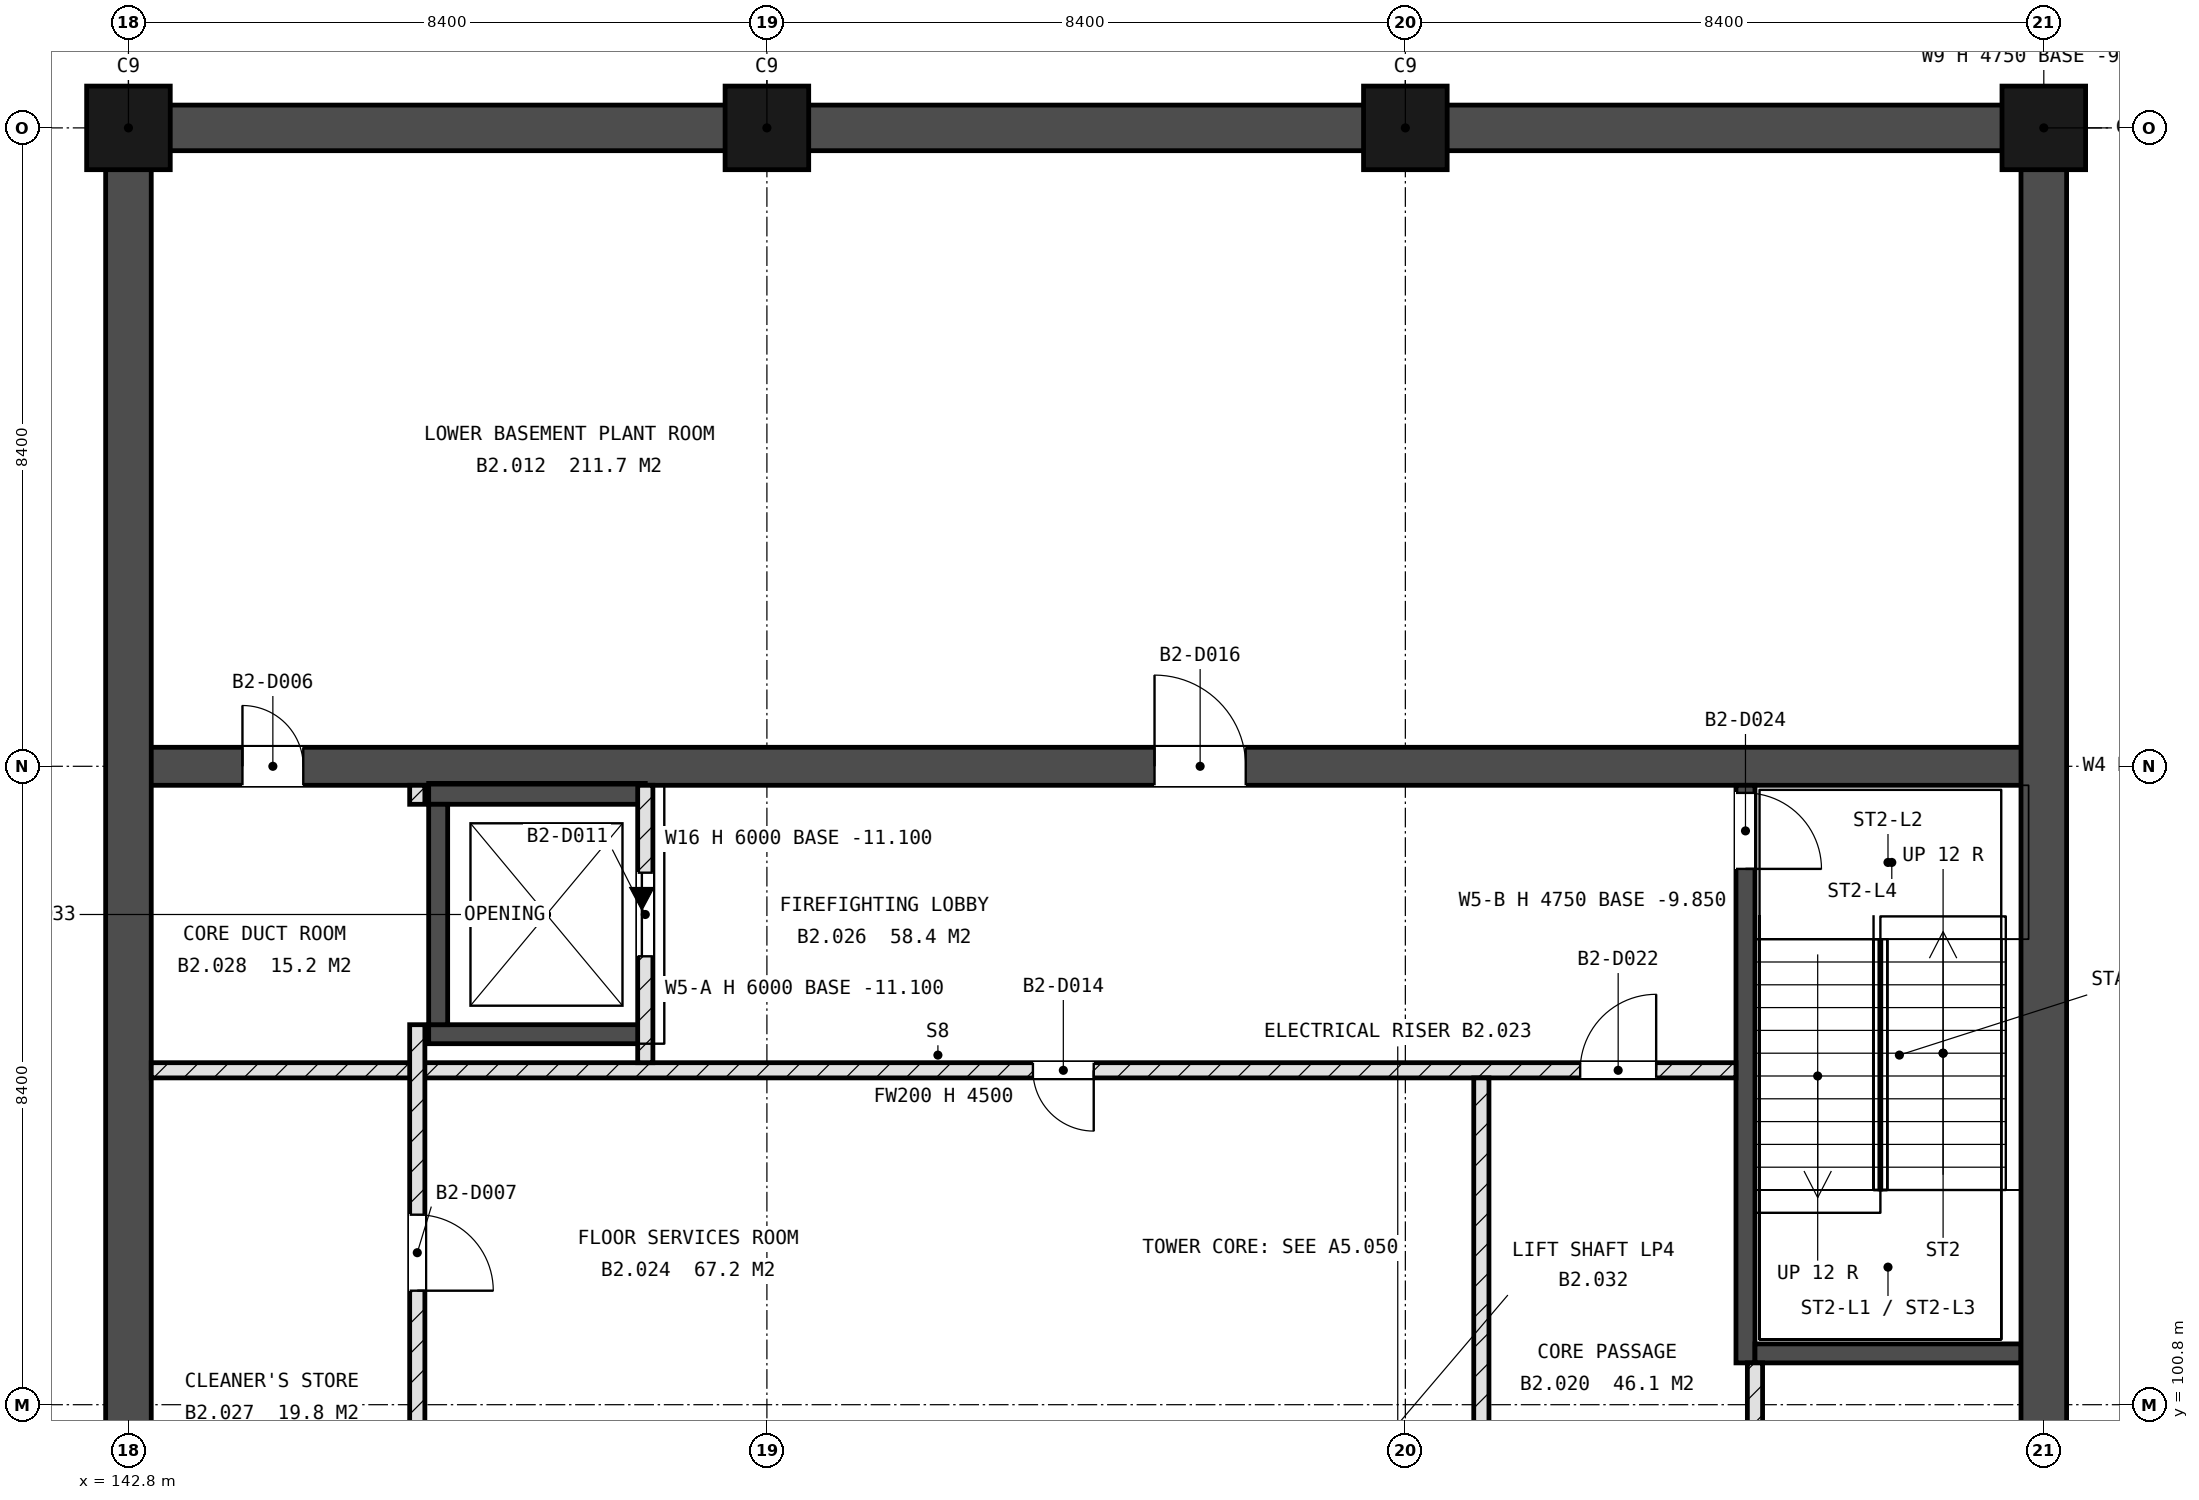
"""IFC4 building model, lengths in metres.
Left out: names, types, materials, properties, quantities, classifications, styles, units other than length and angle.
Written with IfcOpenShell. Run it as: python <this file> out.ifc"""

import sys

from ifc_helpers import new_model, si_unit, direction, frame, frame_2d, origin, origin_2d, place, context, subcontext, project, spatial, rectangle, extrude, element, fill, save


model = new_model("IFC4")
c1 = context("Model", 3, precision=1e-05, world=origin(), true_north=direction((0.0, 1.0)))
c2 = subcontext(c1, "Body", "Model", "MODEL_VIEW")
j1 = project(units=[si_unit("LENGTHUNIT", "METRE"), si_unit("PLANEANGLEUNIT", "RADIAN")], contexts=[c1])
p1 = place(None, origin())
s1 = spatial("IfcSite", under=j1, at=p1, CompositionType="ELEMENT")
p2 = place(p1, origin())
s2 = spatial("IfcBuilding", under=s1, at=p2, CompositionType="ELEMENT")
p3 = place(p2, frame((0.0, 0.0, -9.6)))
s3 = spatial("IfcBuildingStorey", under=s2, at=p3, CompositionType="ELEMENT", Elevation=-9.6)
for number, where, z_axis, x_axis in (
    (1, (142.8, 117.6, -0.25), (0.0, 0.0, 1.0), (1.0, 0.0, 0.0)),
    (2, (151.2, 117.6, -0.25), (0.0, 0.0, 1.0), (1.0, 0.0, 0.0)),
    (3, (159.6, 117.6, -0.25), (0.0, 0.0, 1.0), (1.0, 0.0, 0.0)),
    (4, (168.0, 117.6, -0.25), (0.0, 0.0, 1.0), (1.0, 0.0, 0.0)),
):
    element("IfcColumn", number, at=place(p3, frame(where, z_axis=z_axis, x_axis=x_axis)), inside=s3, PredefinedType="COLUMN", context=c2, shape_type="SweptSolid", body=[
        extrude(rectangle(XDim=1.1, YDim=1.1, at=origin_2d()), origin(), (0.0, 0.0, 1.0), 4.75),
    ])
p4 = place(p3, frame((142.8, 109.2, -0.25), z_axis=(0.0, 0.0, 1.0), x_axis=(1.0, 0.0, 0.0)))
e5 = element("IfcWall", 5, at=p4, inside=s3, PredefinedType="SHEAR", context=c2, shape_type="SweptSolid", body=[
    extrude(rectangle(XDim=25.2, YDim=0.5, at=frame_2d((12.6, 0.0))), origin(), (0.0, 0.0, 1.0), 4.75),
])
p5 = place(p4, frame((13.5, 0.0, 0.25)))
e6 = element("IfcOpeningElement", 6, at=p5, cuts=e5, PredefinedType="OPENING", context=c2, shape_type="SweptSolid", body=[
    extrude(rectangle(XDim=1.2, YDim=2.4, at=frame_2d((0.6, 1.2))), frame((0.0, 0.26, 0.0), z_axis=(0.0, -1.0, 0.0), x_axis=(1.0, 0.0, 0.0)), (0.0, 0.0, 1.0), 0.52),
])
p6 = place(p4, frame((1.5, 0.0, 0.25)))
e7 = element("IfcOpeningElement", 7, at=p6, cuts=e5, PredefinedType="OPENING", context=c2, shape_type="SweptSolid", body=[
    extrude(rectangle(XDim=0.8, YDim=2.1, at=frame_2d((0.4, 1.05))), frame((0.0, 0.26, 0.0), z_axis=(0.0, -1.0, 0.0), x_axis=(1.0, 0.0, 0.0)), (0.0, 0.0, 1.0), 0.52),
])
p7 = place(p3, frame((164.075, 101.35, -0.25), z_axis=(0.0, 0.0, 1.0), x_axis=(0.0, 1.0, 0.0)))
e8 = element("IfcWall", 8, at=p7, inside=s3, PredefinedType="SHEAR", context=c2, shape_type="SweptSolid", body=[
    extrude(rectangle(XDim=7.6, YDim=0.25, at=frame_2d((3.8, 0.0))), origin(), (0.0, 0.0, 1.0), 4.75),
])
p8 = place(p7, frame((6.5, 0.0, 0.25)))
e9 = element("IfcOpeningElement", 9, at=p8, cuts=e8, PredefinedType="OPENING", context=c2, shape_type="SweptSolid", body=[
    extrude(rectangle(XDim=1.0, YDim=2.1, at=frame_2d((0.5, 1.05))), frame((0.0, 0.135, 0.0), z_axis=(0.0, -1.0, 0.0), x_axis=(1.0, 0.0, 0.0)), (0.0, 0.0, 1.0), 0.27),
])
p9 = place(p3, frame((164.2, 101.475, -0.25), z_axis=(0.0, 0.0, 1.0), x_axis=(1.0, 0.0, 0.0)))
e10 = element("IfcWall", 10, at=p9, inside=s3, PredefinedType="SHEAR", context=c2, shape_type="SweptSolid", body=[
    extrude(rectangle(XDim=3.5, YDim=0.25, at=frame_2d((1.75, 0.0))), origin(), (0.0, 0.0, 1.0), 4.75),
])
p10 = place(p3, frame((146.75, 105.675, -1.5), z_axis=(0.0, 0.0, 1.0), x_axis=(1.0, 0.0, 0.0)))
e11 = element("IfcWall", 11, at=p10, inside=s3, PredefinedType="SHEAR", context=c2, shape_type="SweptSolid", body=[
    extrude(rectangle(XDim=2.85, YDim=0.25, at=frame_2d((1.425, 0.0))), origin(), (0.0, 0.0, 1.0), 6.0),
])
p11 = place(p3, frame((146.75, 108.837, -1.5), z_axis=(0.0, 0.0, 1.0), x_axis=(1.0, 0.0, 0.0)))
e12 = element("IfcWall", 12, at=p11, inside=s3, PredefinedType="SHEAR", context=c2, shape_type="SweptSolid", body=[
    extrude(rectangle(XDim=2.85, YDim=0.275, at=frame_2d((1.425, 0.0))), origin(), (0.0, 0.0, 1.0), 6.0),
])
p12 = place(p3, frame((146.875, 105.8, -1.5), z_axis=(0.0, 0.0, 1.0), x_axis=(0.0, 1.0, 0.0)))
e13 = element("IfcWall", 13, at=p12, inside=s3, PredefinedType="SHEAR", context=c2, shape_type="SweptSolid", body=[
    extrude(rectangle(XDim=2.9, YDim=0.25, at=frame_2d((1.45, 0.0))), origin(), (0.0, 0.0, 1.0), 6.0),
])
p13 = place(p3, frame((168.0, -0.3, -0.25), z_axis=(0.0, 0.0, 1.0), x_axis=(0.0, 1.0, 0.0)))
e14 = element("IfcWall", 14, at=p13, inside=s3, PredefinedType="SOLIDWALL", context=c2, shape_type="SweptSolid", body=[
    extrude(rectangle(XDim=118.2, YDim=0.6, at=frame_2d((59.1, 0.0))), origin(), (0.0, 0.0, 1.0), 4.75),
])
p14 = place(p3, frame((168.3, 117.6, -0.25), z_axis=(0.0, 0.0, 1.0), x_axis=(-1.0, 0.0, 0.0)))
e15 = element("IfcWall", 15, at=p14, inside=s3, PredefinedType="SOLIDWALL", context=c2, shape_type="SweptSolid", body=[
    extrude(rectangle(XDim=25.8, YDim=0.6, at=frame_2d((12.9, 0.0))), origin(), (0.0, 0.0, 1.0), 4.75),
])
p15 = place(p3, frame((142.8, 117.9, -0.25), z_axis=(0.0, 0.0, 1.0), x_axis=(0.0, -1.0, 0.0)))
e16 = element("IfcWall", 16, at=p15, inside=s3, PredefinedType="SOLIDWALL", context=c2, shape_type="SweptSolid", body=[
    extrude(rectangle(XDim=34.2, YDim=0.6, at=frame_2d((17.1, 0.0))), origin(), (0.0, 0.0, 1.0), 4.75),
])
p16 = place(p3, frame((143.1, 105.2, 0.0), z_axis=(0.0, 0.0, 1.0), x_axis=(1.0, 0.0, 0.0)))
e17 = element("IfcWall", 17, at=p16, inside=s3, PredefinedType="SOLIDWALL", context=c2, shape_type="SweptSolid", body=[
    extrude(rectangle(XDim=20.85, YDim=0.2, at=frame_2d((10.425, 0.0))), origin(), (0.0, 0.0, 1.0), 4.5),
])
p17 = place(p16, frame((11.6, 0.0, 0.0)))
e18 = element("IfcOpeningElement", 18, at=p17, cuts=e17, PredefinedType="OPENING", context=c2, shape_type="SweptSolid", body=[
    extrude(rectangle(XDim=0.8, YDim=2.1, at=frame_2d((0.4, 1.05))), frame((0.0, 0.11, 0.0), z_axis=(0.0, -1.0, 0.0), x_axis=(1.0, 0.0, 0.0)), (0.0, 0.0, 1.0), 0.22),
])
p18 = place(p16, frame((18.8, 0.0, 0.0)))
e19 = element("IfcOpeningElement", 19, at=p18, cuts=e17, PredefinedType="OPENING", context=c2, shape_type="SweptSolid", body=[
    extrude(rectangle(XDim=1.0, YDim=2.1, at=frame_2d((0.5, 1.05))), frame((0.0, 0.11, 0.0), z_axis=(0.0, -1.0, 0.0), x_axis=(1.0, 0.0, 0.0)), (0.0, 0.0, 1.0), 0.22),
])
p19 = place(p3, frame((146.6, 100.5, 0.0), z_axis=(0.0, 0.0, 1.0), x_axis=(0.0, 1.0, 0.0)))
e20 = element("IfcWall", 20, at=p19, inside=s3, PredefinedType="SOLIDWALL", context=c2, shape_type="SweptSolid", body=[
    extrude(rectangle(XDim=5.3, YDim=0.2, at=frame_2d((2.65, 0.0))), origin(), (0.0, 0.0, 1.0), 4.5),
])
p20 = place(p19, frame((1.8, 0.0, 0.0)))
e21 = element("IfcOpeningElement", 21, at=p20, cuts=e20, PredefinedType="OPENING", context=c2, shape_type="SweptSolid", body=[
    extrude(rectangle(XDim=1.0, YDim=2.1, at=frame_2d((0.5, 1.05))), frame((0.0, 0.11, 0.0), z_axis=(0.0, -1.0, 0.0), x_axis=(1.0, 0.0, 0.0)), (0.0, 0.0, 1.0), 0.22),
])
p21 = place(p3, frame((146.6, 108.7, 0.0), z_axis=(0.0, 0.0, 1.0), x_axis=(0.0, 1.0, 0.0)))
e22 = element("IfcWall", 22, at=p21, inside=s3, PredefinedType="SOLIDWALL", context=c2, shape_type="SweptSolid", body=[
    extrude(rectangle(XDim=0.25, YDim=0.2, at=frame_2d((0.125, 0.0))), origin(), (0.0, 0.0, 1.0), 4.5),
])
p22 = place(p3, frame((149.6, 105.3, 0.0), z_axis=(0.0, 0.0, 1.0), x_axis=(0.0, 1.0, 0.0)))
e23 = element("IfcWall", 23, at=p22, inside=s3, PredefinedType="SOLIDWALL", context=c2, shape_type="SweptSolid", body=[
    extrude(rectangle(XDim=3.65, YDim=0.2, at=frame_2d((1.825, 0.0))), origin(), (0.0, 0.0, 1.0), 4.5),
])
p23 = place(p22, frame((1.4, 0.0, 0.0)))
e24 = element("IfcOpeningElement", 24, at=p23, cuts=e23, PredefinedType="OPENING", context=c2, shape_type="SweptSolid", body=[
    extrude(rectangle(XDim=1.1, YDim=2.1, at=frame_2d((0.55, 1.05))), frame((0.0, 0.11, 0.0), z_axis=(0.0, -1.0, 0.0), x_axis=(1.0, 0.0, 0.0)), (0.0, 0.0, 1.0), 0.22),
])
p24 = place(p3, frame((160.6, 92.65, 0.0), z_axis=(0.0, 0.0, 1.0), x_axis=(0.0, 1.0, 0.0)))
e25 = element("IfcWall", 25, at=p24, inside=s3, PredefinedType="SOLIDWALL", context=c2, shape_type="SweptSolid", body=[
    extrude(rectangle(XDim=12.45, YDim=0.2, at=frame_2d((6.225, 0.0))), origin(), (0.0, 0.0, 1.0), 4.5),
])
p25 = place(p24, frame((5.05, 0.0, 0.0)))
e26 = element("IfcOpeningElement", 26, at=p25, cuts=e25, PredefinedType="OPENING", context=c2, shape_type="SweptSolid", body=[
    extrude(rectangle(XDim=0.8, YDim=2.1, at=frame_2d((0.4, 1.05))), frame((0.0, 0.11, 0.0), z_axis=(0.0, -1.0, 0.0), x_axis=(1.0, 0.0, 0.0)), (0.0, 0.0, 1.0), 0.22),
])
p26 = place(p24, frame((0.75, 0.0, 0.0)))
e27 = element("IfcOpeningElement", 27, at=p26, cuts=e25, PredefinedType="OPENING", context=c2, shape_type="SweptSolid", body=[
    extrude(rectangle(XDim=1.0, YDim=2.1, at=frame_2d((0.5, 1.05))), frame((0.0, 0.11, 0.0), z_axis=(0.0, -1.0, 0.0), x_axis=(1.0, 0.0, 0.0)), (0.0, 0.0, 1.0), 0.22),
])
p27 = place(p3, frame((164.2, 92.65, 0.0), z_axis=(0.0, 0.0, 1.0), x_axis=(0.0, 1.0, 0.0)))
e28 = element("IfcWall", 28, at=p27, inside=s3, PredefinedType="SOLIDWALL", context=c2, shape_type="SweptSolid", body=[
    extrude(rectangle(XDim=8.7, YDim=0.2, at=frame_2d((4.35, 0.0))), origin(), (0.0, 0.0, 1.0), 4.5),
])
p28 = place(p27, frame((1.65, 0.0, 0.0)))
e29 = element("IfcOpeningElement", 29, at=p28, cuts=e28, PredefinedType="OPENING", context=c2, shape_type="SweptSolid", body=[
    extrude(rectangle(XDim=0.8, YDim=2.1, at=frame_2d((0.4, 1.05))), frame((0.0, 0.11, 0.0), z_axis=(0.0, -1.0, 0.0), x_axis=(1.0, 0.0, 0.0)), (0.0, 0.0, 1.0), 0.22),
])
p29 = place(p27, frame((6.25, 0.0, 0.0)))
e30 = element("IfcOpeningElement", 30, at=p29, cuts=e28, PredefinedType="OPENING", context=c2, shape_type="SweptSolid", body=[
    extrude(rectangle(XDim=0.8, YDim=2.1, at=frame_2d((0.4, 1.05))), frame((0.0, 0.11, 0.0), z_axis=(0.0, -1.0, 0.0), x_axis=(1.0, 0.0, 0.0)), (0.0, 0.0, 1.0), 0.22),
])
p30 = place(p23, origin())
e31 = element("IfcDoor", 31, at=p30, inside=s3, OperationType="SLIDING_TO_LEFT", PredefinedType="DOOR", context=c2, shape_type="SweptSolid", body=[
    extrude(rectangle(XDim=1.1, YDim=2.1, at=frame_2d((0.55, 1.05))), frame((0.0, 0.025, 0.0), z_axis=(0.0, -1.0, 0.0), x_axis=(1.0, 0.0, 0.0)), (0.0, 0.0, 1.0), 0.05),
])
fill(e24, e31)
p31 = place(p8, origin())
e32 = element("IfcDoor", 32, at=p31, inside=s3, OperationType="SINGLE_SWING_LEFT", PredefinedType="DOOR", context=c2, shape_type="SweptSolid", body=[
    extrude(rectangle(XDim=1.0, YDim=2.1, at=frame_2d((0.5, 1.05))), frame((0.0, 0.025, 0.0), z_axis=(0.0, -1.0, 0.0), x_axis=(1.0, 0.0, 0.0)), (0.0, 0.0, 1.0), 0.05),
])
fill(e9, e32)
p32 = place(p5, origin())
e33 = element("IfcDoor", 33, at=p32, inside=s3, OperationType="SINGLE_SWING_RIGHT", PredefinedType="DOOR", context=c2, shape_type="SweptSolid", body=[
    extrude(rectangle(XDim=1.2, YDim=2.4, at=frame_2d((0.6, 1.2))), frame((0.0, 0.025, 0.0), z_axis=(0.0, -1.0, 0.0), x_axis=(1.0, 0.0, 0.0)), (0.0, 0.0, 1.0), 0.05),
])
fill(e6, e33)
p33 = place(p17, origin())
e34 = element("IfcDoor", 34, at=p33, inside=s3, OperationType="SINGLE_SWING_RIGHT", PredefinedType="DOOR", context=c2, shape_type="SweptSolid", body=[
    extrude(rectangle(XDim=0.8, YDim=2.1, at=frame_2d((0.4, 1.05))), frame((0.0, 0.025, 0.0), z_axis=(0.0, -1.0, 0.0), x_axis=(1.0, 0.0, 0.0)), (0.0, 0.0, 1.0), 0.05),
])
fill(e18, e34)
p34 = place(p20, origin())
e35 = element("IfcDoor", 35, at=p34, inside=s3, OperationType="SINGLE_SWING_LEFT", PredefinedType="DOOR", context=c2, shape_type="SweptSolid", body=[
    extrude(rectangle(XDim=1.0, YDim=2.1, at=frame_2d((0.5, 1.05))), frame((0.0, 0.025, 0.0), z_axis=(0.0, -1.0, 0.0), x_axis=(1.0, 0.0, 0.0)), (0.0, 0.0, 1.0), 0.05),
])
fill(e21, e35)
p35 = place(p6, origin())
e36 = element("IfcDoor", 36, at=p35, inside=s3, OperationType="SINGLE_SWING_RIGHT", PredefinedType="DOOR", context=c2, shape_type="SweptSolid", body=[
    extrude(rectangle(XDim=0.8, YDim=2.1, at=frame_2d((0.4, 1.05))), frame((0.0, 0.025, 0.0), z_axis=(0.0, -1.0, 0.0), x_axis=(1.0, 0.0, 0.0)), (0.0, 0.0, 1.0), 0.05),
])
fill(e7, e36)
p36 = place(p18, origin())
e37 = element("IfcDoor", 37, at=p36, inside=s3, OperationType="SINGLE_SWING_LEFT", PredefinedType="DOOR", context=c2, shape_type="SweptSolid", body=[
    extrude(rectangle(XDim=1.0, YDim=2.1, at=frame_2d((0.5, 1.05))), frame((0.0, 0.025, 0.0), z_axis=(0.0, -1.0, 0.0), x_axis=(1.0, 0.0, 0.0)), (0.0, 0.0, 1.0), 0.05),
])
fill(e19, e37)
save(model, sys.argv[1])
